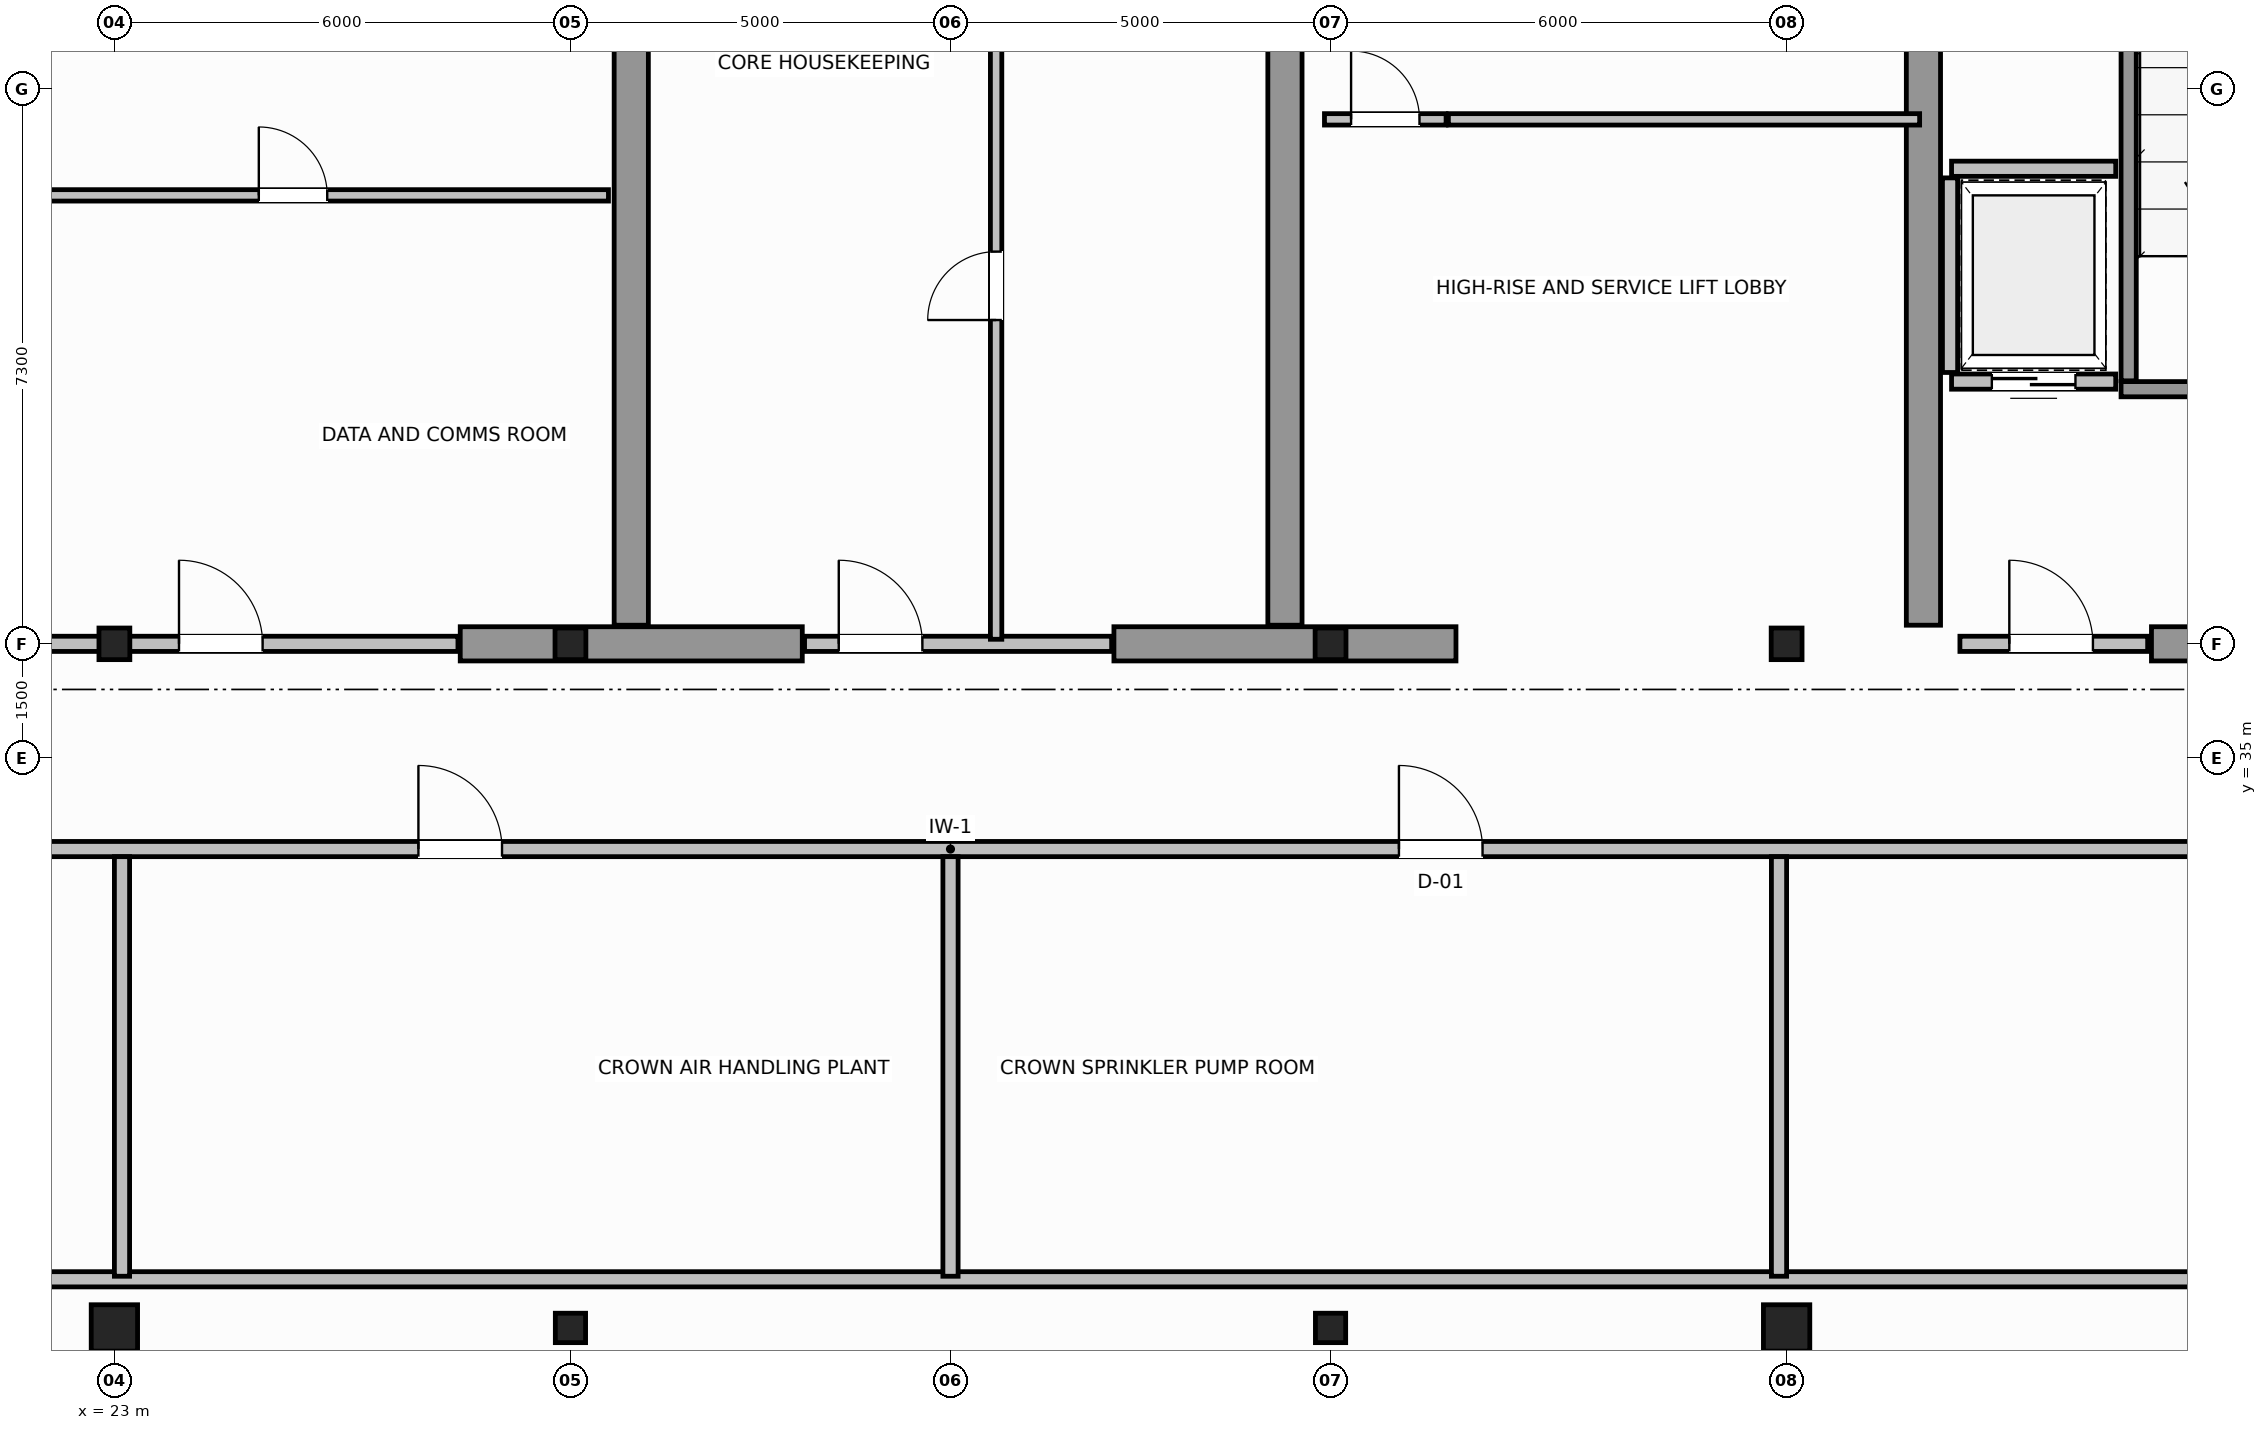
"""IFC4 building model, lengths in metres.
Left out: names, types, materials, properties, quantities, classifications, styles, units other than length and angle.
Written with IfcOpenShell. Run it as: python <this file> out.ifc"""

import sys

from ifc_helpers import new_model, si_unit, direction, frame, frame_2d, origin, origin_2d, place, context, subcontext, project, spatial, rectangle, hollow_circle, i_section, extrude, source, transform, mapped, element, fill, save


model = new_model("IFC4")
c1 = context("Model", 3, precision=1e-05, world=origin(), true_north=direction((0.0, 1.0)))
c2 = subcontext(c1, "Body", "Model", "MODEL_VIEW")
j1 = project(units=[si_unit("LENGTHUNIT", "METRE"), si_unit("PLANEANGLEUNIT", "RADIAN")], contexts=[c1])
p1 = place(None, origin())
s1 = spatial("IfcSite", under=j1, at=p1, CompositionType="ELEMENT")
p2 = place(p1, origin())
s2 = spatial("IfcBuilding", under=s1, at=p2, CompositionType="ELEMENT")
p3 = place(p2, frame((0.0, 0.0, 308.4)))
s3 = spatial("IfcBuildingStorey", under=s2, at=p3, CompositionType="ELEMENT", Elevation=308.4)
m1 = source(origin(), c2, "Body", "SweptSolid", [
    extrude(i_section(OverallWidth=0.406, OverallDepth=0.416, WebThickness=0.03, FlangeThickness=0.042, FilletRadius=0.015, at=origin_2d()), origin(), (0.0, 0.0, 1.0), 4.4),
])
for number, where, z_axis, x_axis in (
    (1, (23.0, 36.5, 0.0), (0.0, 0.0, 1.0), (1.0, 0.0, 0.0)),
    (2, (29.0, 36.5, 0.0), (0.0, 0.0, 1.0), (1.0, 0.0, 0.0)),
    (3, (39.0, 36.5, 0.0), (0.0, 0.0, 1.0), (1.0, 0.0, 0.0)),
    (4, (45.0, 36.5, 0.0), (0.0, 0.0, 1.0), (1.0, 0.0, 0.0)),
):
    element("IfcColumn", number, at=place(p3, frame(where, z_axis=z_axis, x_axis=x_axis)), inside=s3, PredefinedType="COLUMN", context=c2, shape_type="MappedRepresentation", body=[
        mapped(m1, transform((0.0, 0.0, 0.0), scale=1.0)),
    ])
m2 = source(origin(), c2, "Body", "SweptSolid", [
    extrude(hollow_circle(Radius=0.305, WallThickness=0.03, at=origin_2d()), origin(), (0.0, 0.0, 1.0), 4.4),
])
p4 = place(p3, frame((23.0, 27.5, 0.0), z_axis=(0.0, 0.0, 1.0), x_axis=(1.0, 0.0, 0.0)))
e5 = element("IfcColumn", 5, at=p4, inside=s3, PredefinedType="COLUMN", context=c2, shape_type="MappedRepresentation", body=[
    mapped(m2, transform((0.0, 0.0, 0.0), scale=1.0)),
])
m3 = source(origin(), c2, "Body", "SweptSolid", [
    extrude(i_section(OverallWidth=0.398, OverallDepth=0.387, WebThickness=0.021, FlangeThickness=0.029, FilletRadius=0.015, at=origin_2d()), origin(), (0.0, 0.0, 1.0), 4.4),
])
for number, where, z_axis, x_axis in (
    (6, (29.0, 27.5, 0.0), (0.0, 0.0, 1.0), (1.0, 0.0, 0.0)),
    (7, (39.0, 27.5, 0.0), (0.0, 0.0, 1.0), (1.0, 0.0, 0.0)),
):
    element("IfcColumn", number, at=place(p3, frame(where, z_axis=z_axis, x_axis=x_axis)), inside=s3, PredefinedType="COLUMN", context=c2, shape_type="MappedRepresentation", body=[
        mapped(m3, transform((0.0, 0.0, 0.0), scale=1.0)),
    ])
p5 = place(p3, frame((45.0, 27.5, 0.0), z_axis=(0.0, 0.0, 1.0), x_axis=(1.0, 0.0, 0.0)))
e8 = element("IfcColumn", 8, at=p5, inside=s3, PredefinedType="COLUMN", context=c2, shape_type="MappedRepresentation", body=[
    mapped(m2, transform((0.0, 0.0, 0.0), scale=1.0)),
])
for number, where, z_axis, x_axis in (
    (9, (27.55, 36.5, 0.0), (0.0, 0.0, 1.0), (1.0, 0.0, 0.0)),
    (10, (36.15, 36.5, 0.0), (0.0, 0.0, 1.0), (1.0, 0.0, 0.0)),
):
    element("IfcWall", number, at=place(p3, frame(where, z_axis=z_axis, x_axis=x_axis)), inside=s3, PredefinedType="SHEAR", context=c2, shape_type="SweptSolid", body=[
        extrude(rectangle(XDim=4.5, YDim=0.45, at=frame_2d((2.25, 0.0))), origin(), (0.0, 0.0, 1.0), 4.4),
    ])
p6 = place(p3, frame((49.8, 36.5, 0.0), z_axis=(0.0, 0.0, 1.0), x_axis=(1.0, 0.0, 0.0)))
e11 = element("IfcWall", 11, at=p6, inside=s3, PredefinedType="SHEAR", context=c2, shape_type="SweptSolid", body=[
    extrude(rectangle(XDim=3.955, YDim=0.45, at=frame_2d((1.978, 0.0))), origin(), (0.0, 0.0, 1.0), 3.1),
])
for number, where, z_axis, x_axis in (
    (12, (29.8, 36.745, 0.0), (0.0, 0.0, 1.0), (0.0, 1.0, 0.0)),
    (13, (38.4, 36.745, 0.0), (0.0, 0.0, 1.0), (0.0, 1.0, 0.0)),
    (14, (46.8, 36.745, 0.0), (0.0, 0.0, 1.0), (0.0, 1.0, 0.0)),
):
    element("IfcWall", number, at=place(p3, frame(where, z_axis=z_axis, x_axis=x_axis)), inside=s3, PredefinedType="SHEAR", context=c2, shape_type="SweptSolid", body=[
        extrude(rectangle(XDim=9.455, YDim=0.45, at=frame_2d((4.728, 0.0))), origin(), (0.0, 0.0, 1.0), 4.4),
    ])
p7 = place(p3, frame((49.4, 39.85, 0.0), z_axis=(0.0, 0.0, 1.0), x_axis=(1.0, 0.0, 0.0)))
e15 = element("IfcWall", 15, at=p7, inside=s3, PredefinedType="SOLIDWALL", context=c2, shape_type="SweptSolid", body=[
    extrude(rectangle(XDim=4.375, YDim=0.2, at=frame_2d((2.188, 0.0))), origin(), (0.0, 0.0, 1.0), 4.4),
])
p8 = place(p7, frame((1.325, 0.0, 0.0)))
e16 = element("IfcOpeningElement", 16, at=p8, cuts=e15, PredefinedType="OPENING", context=c2, shape_type="SweptSolid", body=[
    extrude(rectangle(XDim=1.1, YDim=2.15, at=frame_2d((0.55, 1.075))), frame((0.0, 0.11, 0.0), z_axis=(0.0, -1.0, 0.0), x_axis=(1.0, 0.0, 0.0)), (0.0, 0.0, 1.0), 0.22),
])
p9 = place(p3, frame((49.5, 39.96, 0.0), z_axis=(0.0, 0.0, 1.0), x_axis=(0.0, 1.0, 0.0)))
e17 = element("IfcWall", 17, at=p9, inside=s3, PredefinedType="SOLIDWALL", context=c2, shape_type="SweptSolid", body=[
    extrude(rectangle(XDim=9.93, YDim=0.2, at=frame_2d((4.965, 0.0))), origin(), (0.0, 0.0, 1.0), 4.4),
])
p10 = place(p3, frame((47.28, 36.5, 0.0), z_axis=(0.0, 0.0, 1.0), x_axis=(1.0, 0.0, 0.0)))
e18 = element("IfcWall", 18, at=p10, inside=s3, PredefinedType="SOLIDWALL", context=c2, shape_type="SweptSolid", body=[
    extrude(rectangle(XDim=2.47, YDim=0.2, at=frame_2d((1.235, 0.0))), origin(), (0.0, 0.0, 1.0), 3.09),
])
p11 = place(p10, frame((0.65, 0.0, 0.0)))
e19 = element("IfcOpeningElement", 19, at=p11, cuts=e18, PredefinedType="OPENING", context=c2, shape_type="SweptSolid", body=[
    extrude(rectangle(XDim=1.1, YDim=2.15, at=frame_2d((0.55, 1.075))), frame((0.0, 0.11, 0.0), z_axis=(0.0, -1.0, 0.0), x_axis=(1.0, 0.0, 0.0)), (0.0, 0.0, 1.0), 0.22),
])
p12 = place(p3, frame((47.17, 39.95, 0.0), z_axis=(0.0, 0.0, 1.0), x_axis=(1.0, 0.0, 0.0)))
e20 = element("IfcWall", 20, at=p12, inside=s3, PredefinedType="SOLIDWALL", context=c2, shape_type="SweptSolid", body=[
    extrude(rectangle(XDim=2.16, YDim=0.2, at=frame_2d((1.08, 0.0))), origin(), (0.0, 0.0, 1.0), 4.1),
])
p13 = place(p12, frame((0.53, 0.0, 0.0)))
e21 = element("IfcOpeningElement", 21, at=p13, cuts=e20, PredefinedType="OPENING", context=c2, shape_type="SweptSolid", body=[
    extrude(rectangle(XDim=1.1, YDim=2.15, at=frame_2d((0.55, 1.075))), frame((0.0, 0.11, 0.0), z_axis=(0.0, -1.0, 0.0), x_axis=(1.0, 0.0, 0.0)), (0.0, 0.0, 1.0), 0.22),
])
p14 = place(p3, frame((47.17, 42.75, 0.0), z_axis=(0.0, 0.0, 1.0), x_axis=(1.0, 0.0, 0.0)))
e22 = element("IfcWall", 22, at=p14, inside=s3, PredefinedType="SOLIDWALL", context=c2, shape_type="SweptSolid", body=[
    extrude(rectangle(XDim=2.16, YDim=0.2, at=frame_2d((1.08, 0.0))), origin(), (0.0, 0.0, 1.0), 4.1),
])
p15 = place(p3, frame((47.15, 40.07, 0.0), z_axis=(0.0, 0.0, 1.0), x_axis=(0.0, 1.0, 0.0)))
e23 = element("IfcWall", 23, at=p15, inside=s3, PredefinedType="SOLIDWALL", context=c2, shape_type="SweptSolid", body=[
    extrude(rectangle(XDim=2.56, YDim=0.2, at=frame_2d((1.28, 0.0))), origin(), (0.0, 0.0, 1.0), 4.1),
])
p16 = place(p3, frame((21.25, 36.5, 0.0), z_axis=(0.0, 0.0, 1.0), x_axis=(1.0, 0.0, 0.0)))
e24 = element("IfcWall", 24, at=p16, inside=s3, PredefinedType="SOLIDWALL", context=c2, shape_type="SweptSolid", body=[
    extrude(rectangle(XDim=6.27, YDim=0.2, at=frame_2d((3.135, 0.0))), origin(), (0.0, 0.0, 1.0), 2.89),
])
p17 = place(p16, frame((2.6, 0.0, 0.0)))
e25 = element("IfcOpeningElement", 25, at=p17, cuts=e24, PredefinedType="OPENING", context=c2, shape_type="SweptSolid", body=[
    extrude(rectangle(XDim=1.1, YDim=2.15, at=frame_2d((0.55, 1.075))), frame((0.0, 0.11, 0.0), z_axis=(0.0, -1.0, 0.0), x_axis=(1.0, 0.0, 0.0)), (0.0, 0.0, 1.0), 0.22),
])
p18 = place(p3, frame((21.5, 42.4, 0.0), z_axis=(0.0, 0.0, 1.0), x_axis=(1.0, 0.0, 0.0)))
e26 = element("IfcWall", 26, at=p18, inside=s3, PredefinedType="PARTITIONING", context=c2, shape_type="SweptSolid", body=[
    extrude(rectangle(XDim=8.0, YDim=0.15, at=frame_2d((4.0, 0.0))), origin(), (0.0, 0.0, 1.0), 4.1),
])
p19 = place(p18, frame((3.4, 0.0, 0.0)))
e27 = element("IfcOpeningElement", 27, at=p19, cuts=e26, PredefinedType="OPENING", context=c2, shape_type="SweptSolid", body=[
    extrude(rectangle(XDim=0.9, YDim=2.1, at=frame_2d((0.45, 1.05))), frame((0.0, 0.085, 0.0), z_axis=(0.0, -1.0, 0.0), x_axis=(1.0, 0.0, 0.0)), (0.0, 0.0, 1.0), 0.17),
])
p20 = place(p3, frame((32.08, 36.5, 0.0), z_axis=(0.0, 0.0, 1.0), x_axis=(1.0, 0.0, 0.0)))
e28 = element("IfcWall", 28, at=p20, inside=s3, PredefinedType="SOLIDWALL", context=c2, shape_type="SweptSolid", body=[
    extrude(rectangle(XDim=4.04, YDim=0.2, at=frame_2d((2.02, 0.0))), origin(), (0.0, 0.0, 1.0), 2.89),
])
p21 = place(p20, frame((0.45, 0.0, 0.0)))
e29 = element("IfcOpeningElement", 29, at=p21, cuts=e28, PredefinedType="OPENING", context=c2, shape_type="SweptSolid", body=[
    extrude(rectangle(XDim=1.1, YDim=2.15, at=frame_2d((0.55, 1.075))), frame((0.0, 0.11, 0.0), z_axis=(0.0, -1.0, 0.0), x_axis=(1.0, 0.0, 0.0)), (0.0, 0.0, 1.0), 0.22),
])
p22 = place(p3, frame((34.6, 36.56, 0.0), z_axis=(0.0, 0.0, 1.0), x_axis=(0.0, 1.0, 0.0)))
e30 = element("IfcWall", 30, at=p22, inside=s3, PredefinedType="PARTITIONING", context=c2, shape_type="SweptSolid", body=[
    extrude(rectangle(XDim=9.58, YDim=0.15, at=frame_2d((4.79, 0.0))), origin(), (0.0, 0.0, 1.0), 4.1),
])
p23 = place(p22, frame((4.2, 0.0, 0.0)))
e31 = element("IfcOpeningElement", 31, at=p23, cuts=e30, PredefinedType="OPENING", context=c2, shape_type="SweptSolid", body=[
    extrude(rectangle(XDim=0.9, YDim=2.1, at=frame_2d((0.45, 1.05))), frame((0.0, 0.085, 0.0), z_axis=(0.0, -1.0, 0.0), x_axis=(1.0, 0.0, 0.0)), (0.0, 0.0, 1.0), 0.17),
])
p24 = place(p3, frame((40.55, 43.4, 0.0), z_axis=(0.0, 0.0, 1.0), x_axis=(1.0, 0.0, 0.0)))
e32 = element("IfcWall", 32, at=p24, inside=s3, PredefinedType="PARTITIONING", context=c2, shape_type="SweptSolid", body=[
    extrude(rectangle(XDim=6.2, YDim=0.15, at=frame_2d((3.1, 0.0))), origin(), (0.0, 0.0, 1.0), 4.1),
])
p25 = place(p3, frame((38.92, 43.4, 0.0), z_axis=(0.0, 0.0, 1.0), x_axis=(1.0, 0.0, 0.0)))
e33 = element("IfcWall", 33, at=p25, inside=s3, PredefinedType="PARTITIONING", context=c2, shape_type="SweptSolid", body=[
    extrude(rectangle(XDim=1.6, YDim=0.15, at=frame_2d((0.8, 0.0))), origin(), (0.0, 0.0, 1.0), 4.1),
])
p26 = place(p25, frame((0.35, 0.0, 0.0)))
e34 = element("IfcOpeningElement", 34, at=p26, cuts=e33, PredefinedType="OPENING", context=c2, shape_type="SweptSolid", body=[
    extrude(rectangle(XDim=0.9, YDim=2.1, at=frame_2d((0.45, 1.05))), frame((0.0, 0.085, 0.0), z_axis=(0.0, -1.0, 0.0), x_axis=(1.0, 0.0, 0.0)), (0.0, 0.0, 1.0), 0.17),
])
p27 = place(p3, frame((7.978, 33.8, 0.0), z_axis=(0.0, 0.0, 1.0), x_axis=(1.0, 0.0, 0.0)))
e35 = element("IfcWall", 35, at=p27, inside=s3, PredefinedType="SOLIDWALL", context=c2, shape_type="SweptSolid", body=[
    extrude(rectangle(XDim=52.044, YDim=0.2, at=frame_2d((26.022, 0.0))), origin(), (0.0, 0.0, 1.0), 4.1),
])
p28 = place(p27, frame((7.111, 0.0, 0.0)))
e36 = element("IfcOpeningElement", 36, at=p28, cuts=e35, PredefinedType="OPENING", context=c2, shape_type="SweptSolid", body=[
    extrude(rectangle(XDim=1.1, YDim=2.15, at=frame_2d((0.55, 1.075))), frame((0.0, 0.11, 0.0), z_axis=(0.0, -1.0, 0.0), x_axis=(1.0, 0.0, 0.0)), (0.0, 0.0, 1.0), 0.22),
])
p29 = place(p27, frame((19.022, 0.0, 0.0)))
e37 = element("IfcOpeningElement", 37, at=p29, cuts=e35, PredefinedType="OPENING", context=c2, shape_type="SweptSolid", body=[
    extrude(rectangle(XDim=1.1, YDim=2.15, at=frame_2d((0.55, 1.075))), frame((0.0, 0.11, 0.0), z_axis=(0.0, -1.0, 0.0), x_axis=(1.0, 0.0, 0.0)), (0.0, 0.0, 1.0), 0.22),
])
p30 = place(p27, frame((31.922, 0.0, 0.0)))
e38 = element("IfcOpeningElement", 38, at=p30, cuts=e35, PredefinedType="OPENING", context=c2, shape_type="SweptSolid", body=[
    extrude(rectangle(XDim=1.1, YDim=2.15, at=frame_2d((0.55, 1.075))), frame((0.0, 0.11, 0.0), z_axis=(0.0, -1.0, 0.0), x_axis=(1.0, 0.0, 0.0)), (0.0, 0.0, 1.0), 0.22),
])
p31 = place(p27, frame((43.833, 0.0, 0.0)))
e39 = element("IfcOpeningElement", 39, at=p31, cuts=e35, PredefinedType="OPENING", context=c2, shape_type="SweptSolid", body=[
    extrude(rectangle(XDim=1.1, YDim=2.15, at=frame_2d((0.55, 1.075))), frame((0.0, 0.11, 0.0), z_axis=(0.0, -1.0, 0.0), x_axis=(1.0, 0.0, 0.0)), (0.0, 0.0, 1.0), 0.22),
])
p32 = place(p3, frame((9.094, 28.14, 0.0), z_axis=(0.0, 0.0, 1.0), x_axis=(1.0, 0.0, 0.0)))
e40 = element("IfcWall", 40, at=p32, inside=s3, PredefinedType="SOLIDWALL", context=c2, shape_type="SweptSolid", body=[
    extrude(rectangle(XDim=49.813, YDim=0.2, at=frame_2d((24.906, 0.0))), origin(), (0.0, 0.0, 1.0), 4.1),
])
p33 = place(p3, frame((23.1, 28.18, 0.0), z_axis=(0.0, 0.0, 1.0), x_axis=(0.0, 1.0, 0.0)))
e41 = element("IfcWall", 41, at=p33, inside=s3, PredefinedType="SOLIDWALL", context=c2, shape_type="SweptSolid", body=[
    extrude(rectangle(XDim=5.52, YDim=0.2, at=frame_2d((2.76, 0.0))), origin(), (0.0, 0.0, 1.0), 2.89),
])
p34 = place(p3, frame((34.0, 28.18, 0.0), z_axis=(0.0, 0.0, 1.0), x_axis=(0.0, 1.0, 0.0)))
e42 = element("IfcWall", 42, at=p34, inside=s3, PredefinedType="SOLIDWALL", context=c2, shape_type="SweptSolid", body=[
    extrude(rectangle(XDim=5.52, YDim=0.2, at=frame_2d((2.76, 0.0))), origin(), (0.0, 0.0, 1.0), 4.1),
])
p35 = place(p3, frame((44.9, 28.18, 0.0), z_axis=(0.0, 0.0, 1.0), x_axis=(0.0, 1.0, 0.0)))
e43 = element("IfcWall", 43, at=p35, inside=s3, PredefinedType="SOLIDWALL", context=c2, shape_type="SweptSolid", body=[
    extrude(rectangle(XDim=5.52, YDim=0.2, at=frame_2d((2.76, 0.0))), origin(), (0.0, 0.0, 1.0), 2.89),
])
m4 = source(origin(), c2, "Body", "SweptSolid", [
    extrude(rectangle(XDim=1.1, YDim=2.15, at=frame_2d((0.55, 1.075))), frame((0.0, 0.025, 0.0), z_axis=(0.0, -1.0, 0.0), x_axis=(1.0, 0.0, 0.0)), (0.0, 0.0, 1.0), 0.05),
])
p36 = place(p11, origin())
e44 = element("IfcDoor", 44, at=p36, inside=s3, OperationType="SINGLE_SWING_LEFT", PredefinedType="DOOR", context=c2, shape_type="MappedRepresentation", body=[
    mapped(m4, transform((0.0, 0.0, 0.0), scale=1.0)),
])
fill(e19, e44)
p37 = place(p13, origin())
e45 = element("IfcDoor", 45, at=p37, inside=s3, OperationType="DOUBLE_DOOR_SLIDING", PredefinedType="DOOR", context=c2, shape_type="MappedRepresentation", body=[
    mapped(m4, transform((0.0, 0.0, 0.0), scale=1.0)),
])
fill(e21, e45)
p38 = place(p17, origin())
e46 = element("IfcDoor", 46, at=p38, inside=s3, OperationType="SINGLE_SWING_LEFT", PredefinedType="DOOR", context=c2, shape_type="MappedRepresentation", body=[
    mapped(m4, transform((0.0, 0.0, 0.0), scale=1.0)),
])
fill(e25, e46)
m5 = source(origin(), c2, "Body", "SweptSolid", [
    extrude(rectangle(XDim=0.9, YDim=2.1, at=frame_2d((0.45, 1.05))), frame((0.0, 0.025, 0.0), z_axis=(0.0, -1.0, 0.0), x_axis=(1.0, 0.0, 0.0)), (0.0, 0.0, 1.0), 0.05),
])
p39 = place(p19, origin())
e47 = element("IfcDoor", 47, at=p39, inside=s3, OperationType="SINGLE_SWING_RIGHT", PredefinedType="DOOR", context=c2, shape_type="MappedRepresentation", body=[
    mapped(m5, transform((0.0, 0.0, 0.0), scale=1.0)),
])
fill(e27, e47)
p40 = place(p21, origin())
e48 = element("IfcDoor", 48, at=p40, inside=s3, OperationType="SINGLE_SWING_LEFT", PredefinedType="DOOR", context=c2, shape_type="MappedRepresentation", body=[
    mapped(m4, transform((0.0, 0.0, 0.0), scale=1.0)),
])
fill(e29, e48)
p41 = place(p23, origin())
e49 = element("IfcDoor", 49, at=p41, inside=s3, OperationType="SINGLE_SWING_RIGHT", PredefinedType="DOOR", context=c2, shape_type="MappedRepresentation", body=[
    mapped(m5, transform((0.0, 0.0, 0.0), scale=1.0)),
])
fill(e31, e49)
p42 = place(p26, origin())
e50 = element("IfcDoor", 50, at=p42, inside=s3, OperationType="SINGLE_SWING_LEFT", PredefinedType="DOOR", context=c2, shape_type="MappedRepresentation", body=[
    mapped(m5, transform((0.0, 0.0, 0.0), scale=1.0)),
])
fill(e34, e50)
p43 = place(p29, origin())
e51 = element("IfcDoor", 51, at=p43, inside=s3, OperationType="SINGLE_SWING_RIGHT", PredefinedType="DOOR", context=c2, shape_type="MappedRepresentation", body=[
    mapped(m4, transform((0.0, 0.0, 0.0), scale=1.0)),
])
fill(e37, e51)
p44 = place(p30, origin())
e52 = element("IfcDoor", 52, at=p44, inside=s3, OperationType="SINGLE_SWING_LEFT", PredefinedType="DOOR", context=c2, shape_type="MappedRepresentation", body=[
    mapped(m4, transform((0.0, 0.0, 0.0), scale=1.0)),
])
fill(e38, e52)
save(model, sys.argv[1])
